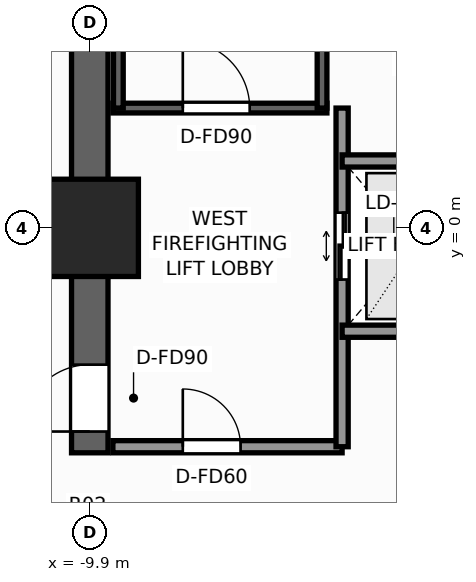
"""IFC4 building model, lengths in metres.
Left out: names, types, materials, properties, quantities, classifications, styles, units other than length and angle.
Written with IfcOpenShell. Run it as: python <this file> out.ifc"""

import sys

from ifc_helpers import new_model, si_unit, direction, frame, frame_2d, origin, origin_2d, place, context, subcontext, project, spatial, rectangle, extrude, element, fill, save


model = new_model("IFC4")
c1 = context("Model", 3, precision=1e-05, world=origin(), true_north=direction((0.0, 1.0)))
c2 = subcontext(c1, "Body", "Model", "MODEL_VIEW")
j1 = project(units=[si_unit("LENGTHUNIT", "METRE"), si_unit("PLANEANGLEUNIT", "RADIAN")], contexts=[c1])
p1 = place(None, origin())
s1 = spatial("IfcSite", under=j1, at=p1, CompositionType="ELEMENT")
p2 = place(p1, origin())
s2 = spatial("IfcBuilding", under=s1, at=p2, CompositionType="ELEMENT")
p3 = place(p2, frame((0.0, 0.0, 5.5)))
s3 = spatial("IfcBuildingStorey", under=s2, at=p3, CompositionType="ELEMENT", Elevation=5.5)
p4 = place(p3, frame((-9.9, -3.7, 0.0), z_axis=(0.0, 0.0, 1.0), x_axis=(0.0, 1.0, 0.0)))
e1 = element("IfcWall", 1, at=p4, inside=s3, PredefinedType="SHEAR", context=c2, shape_type="SweptSolid", body=[
    extrude(rectangle(XDim=13.3, YDim=0.6, at=frame_2d((6.65, 0.0))), origin(), (0.0, 0.0, 1.0), 4.5),
])
p5 = place(p4, frame((0.35, 0.0, 0.0)))
e2 = element("IfcOpeningElement", 2, at=p5, cuts=e1, PredefinedType="OPENING", context=c2, shape_type="SweptSolid", body=[
    extrude(rectangle(XDim=1.1, YDim=2.2, at=frame_2d((0.55, 1.1))), frame((0.0, 0.31, 0.0), z_axis=(0.0, -1.0, 0.0), x_axis=(1.0, 0.0, 0.0)), (0.0, 0.0, 1.0), 0.62),
])
p6 = place(p3, frame((-9.9, 0.0, 0.0), z_axis=(0.0, 0.0, 1.0), x_axis=(1.0, 0.0, 0.0)))
e3 = element("IfcColumn", 3, at=p6, inside=s3, PredefinedType="COLUMN", context=c2, shape_type="SweptSolid", body=[
    extrude(rectangle(XDim=1.6, YDim=1.6, at=origin_2d()), origin(), (0.0, 0.0, 1.0), 4.5),
])
p7 = place(p3, frame((-9.52, 1.97, 0.0), z_axis=(0.0, 0.0, 1.0), x_axis=(1.0, 0.0, 0.0)))
e4 = element("IfcWall", 4, at=p7, inside=s3, PredefinedType="SHEAR", context=c2, shape_type="SweptSolid", body=[
    extrude(rectangle(XDim=3.52, YDim=0.16, at=frame_2d((1.76, 0.0))), origin(), (0.0, 0.0, 1.0), 4.5),
])
p8 = place(p7, frame((1.15, 0.0, 0.0)))
e5 = element("IfcOpeningElement", 5, at=p8, cuts=e4, PredefinedType="OPENING", context=c2, shape_type="SweptSolid", body=[
    extrude(rectangle(XDim=1.1, YDim=2.2, at=frame_2d((0.55, 1.1))), frame((0.0, 0.09, 0.0), z_axis=(0.0, -1.0, 0.0), x_axis=(1.0, 0.0, 0.0)), (0.0, 0.0, 1.0), 0.18),
])
for number, where, z_axis, x_axis in (
    (6, (-9.43, 1.97, 0.0), (0.0, 0.0, 1.0), (0.0, 1.0, 0.0)),
    (7, (-6.08, 1.97, 0.0), (0.0, 0.0, 1.0), (0.0, 1.0, 0.0)),
):
    element("IfcWall", number, at=place(p3, frame(where, z_axis=z_axis, x_axis=x_axis)), inside=s3, PredefinedType="SHEAR", context=c2, shape_type="SweptSolid", body=[
        extrude(rectangle(XDim=7.56, YDim=0.16, at=frame_2d((3.78, 0.0))), origin(), (0.0, 0.0, 1.0), 4.5),
    ])
p9 = place(p3, frame((-9.52, -3.6, 0.0), z_axis=(0.0, 0.0, 1.0), x_axis=(1.0, 0.0, 0.0)))
e8 = element("IfcWall", 8, at=p9, inside=s3, PredefinedType="SOLIDWALL", context=c2, shape_type="SweptSolid", body=[
    extrude(rectangle(XDim=3.77, YDim=0.2, at=frame_2d((1.885, 0.0))), origin(), (0.0, 0.0, 1.0), 4.22),
])
p10 = place(p9, frame((1.15, 0.0, 0.0)))
e9 = element("IfcOpeningElement", 9, at=p10, cuts=e8, PredefinedType="OPENING", context=c2, shape_type="SweptSolid", body=[
    extrude(rectangle(XDim=0.95, YDim=2.06, at=frame_2d((0.475, 1.03))), frame((0.0, 0.11, 0.0), z_axis=(0.0, -1.0, 0.0), x_axis=(1.0, 0.0, 0.0)), (0.0, 0.0, 1.0), 0.22),
])
p11 = place(p3, frame((-5.75, -3.6, 0.0), z_axis=(0.0, 0.0, 1.0), x_axis=(0.0, 1.0, 0.0)))
e10 = element("IfcWall", 10, at=p11, inside=s3, PredefinedType="SOLIDWALL", context=c2, shape_type="SweptSolid", body=[
    extrude(rectangle(XDim=5.57, YDim=0.2, at=frame_2d((2.785, 0.0))), origin(), (0.0, 0.0, 1.0), 4.22),
])
p12 = place(p11, frame((2.75, 0.0, 0.0)))
e11 = element("IfcOpeningElement", 11, at=p12, cuts=e10, PredefinedType="OPENING", context=c2, shape_type="SweptSolid", body=[
    extrude(rectangle(XDim=1.1, YDim=2.2, at=frame_2d((0.55, 1.1))), frame((0.0, 0.11, 0.0), z_axis=(0.0, -1.0, 0.0), x_axis=(1.0, 0.0, 0.0)), (0.0, 0.0, 1.0), 0.22),
])
for number, where, z_axis, x_axis in (
    (12, (-5.75, -1.7, 0.0), (0.0, 0.0, 1.0), (1.0, 0.0, 0.0)),
    (13, (-5.75, 1.1, 0.0), (0.0, 0.0, 1.0), (1.0, 0.0, 0.0)),
):
    element("IfcWall", number, at=place(p3, frame(where, z_axis=z_axis, x_axis=x_axis)), inside=s3, PredefinedType="SOLIDWALL", context=c2, shape_type="SweptSolid", body=[
        extrude(rectangle(XDim=2.4, YDim=0.2, at=frame_2d((1.2, 0.0))), origin(), (0.0, 0.0, 1.0), 4.22),
    ])
p13 = place(p8, origin())
e14 = element("IfcDoor", 14, at=p13, inside=s3, OperationType="SINGLE_SWING_LEFT", PredefinedType="DOOR", context=c2, shape_type="SweptSolid", body=[
    extrude(rectangle(XDim=1.1, YDim=2.2, at=frame_2d((0.55, 1.1))), frame((0.0, 0.025, 0.0), z_axis=(0.0, -1.0, 0.0), x_axis=(1.0, 0.0, 0.0)), (0.0, 0.0, 1.0), 0.05),
])
fill(e5, e14)
p14 = place(p5, origin())
e15 = element("IfcDoor", 15, at=p14, inside=s3, OperationType="SINGLE_SWING_LEFT", PredefinedType="DOOR", context=c2, shape_type="SweptSolid", body=[
    extrude(rectangle(XDim=1.1, YDim=2.2, at=frame_2d((0.55, 1.1))), frame((0.0, 0.025, 0.0), z_axis=(0.0, -1.0, 0.0), x_axis=(1.0, 0.0, 0.0)), (0.0, 0.0, 1.0), 0.05),
])
fill(e2, e15)
p15 = place(p12, origin())
e16 = element("IfcDoor", 16, at=p15, inside=s3, OperationType="DOUBLE_DOOR_SLIDING", PredefinedType="DOOR", context=c2, shape_type="SweptSolid", body=[
    extrude(rectangle(XDim=1.1, YDim=2.2, at=frame_2d((0.55, 1.1))), frame((0.0, 0.025, 0.0), z_axis=(0.0, -1.0, 0.0), x_axis=(1.0, 0.0, 0.0)), (0.0, 0.0, 1.0), 0.05),
])
fill(e11, e16)
p16 = place(p10, origin())
e17 = element("IfcDoor", 17, at=p16, inside=s3, OperationType="SINGLE_SWING_LEFT", PredefinedType="DOOR", context=c2, shape_type="SweptSolid", body=[
    extrude(rectangle(XDim=0.95, YDim=2.06, at=frame_2d((0.475, 1.03))), frame((0.0, 0.025, 0.0), z_axis=(0.0, -1.0, 0.0), x_axis=(1.0, 0.0, 0.0)), (0.0, 0.0, 1.0), 0.05),
])
fill(e9, e17)
save(model, sys.argv[1])
